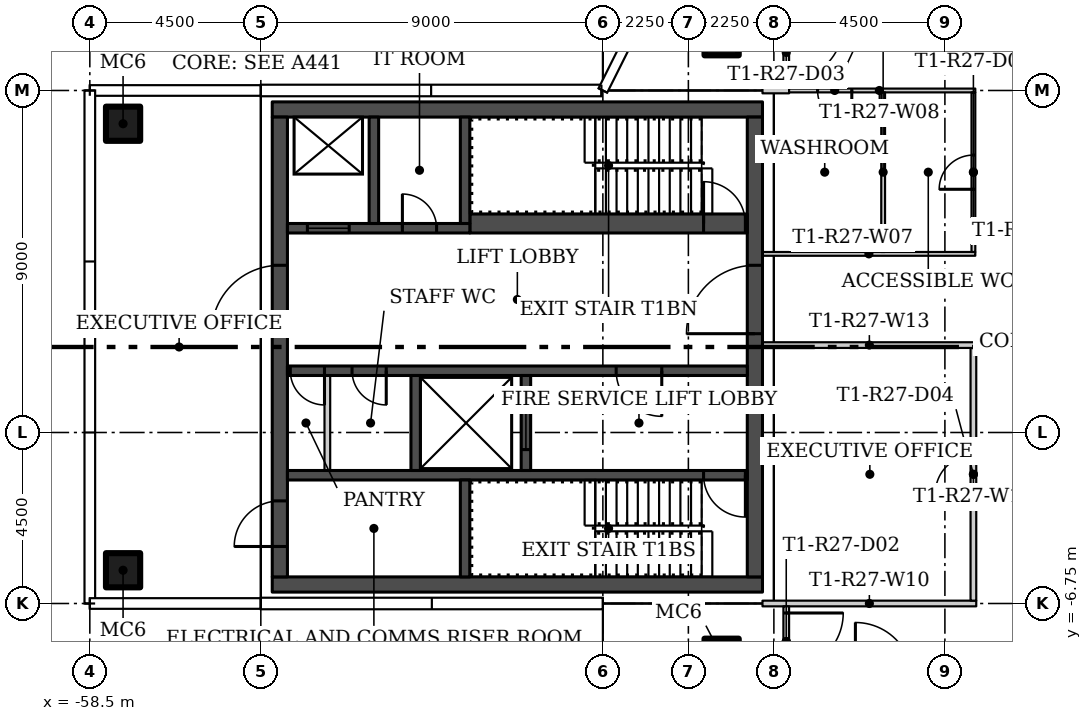
"""IFC4 building model, lengths in metres.
Left out: names, types, materials, properties, quantities, classifications, styles, units other than length and angle.
Written with IfcOpenShell. Run it as: python <this file> out.ifc"""

import sys

from ifc_helpers import new_model, si_unit, direction, frame, frame_2d, origin, origin_2d, place, context, subcontext, project, spatial, rectangle, hollow_rectangle, extrude, element, fill, save


model = new_model("IFC4")
c1 = context("Model", 3, precision=1e-05, world=origin(), true_north=direction((0.0, 1.0)))
c2 = subcontext(c1, "Body", "Model", "MODEL_VIEW")
j1 = project(units=[si_unit("LENGTHUNIT", "METRE"), si_unit("PLANEANGLEUNIT", "RADIAN")], contexts=[c1])
p1 = place(None, origin())
s1 = spatial("IfcSite", under=j1, at=p1, CompositionType="ELEMENT")
p2 = place(p1, origin())
s2 = spatial("IfcBuilding", under=s1, at=p2, CompositionType="ELEMENT")
p3 = place(p2, frame((0.0, 0.0, 249.9)))
s3 = spatial("IfcBuildingStorey", under=s2, at=p3, CompositionType="ELEMENT", Elevation=249.9)
for number, where in (
    (1, (-41.875, 8.125, 0.0)),
    (2, (-41.875, -8.125, 0.0)),
    (3, (-57.625, -5.875, 0.0)),
    (4, (-57.625, 5.875, 0.0)),
):
    element("IfcColumn", number, at=place(p3, frame(where)), inside=s3, PredefinedType="COLUMN", context=c2, shape_type="SweptSolid", body=[
        extrude(hollow_rectangle(XDim=0.9, YDim=0.9, WallThickness=0.036, at=origin_2d()), origin(), (0.0, 0.0, 1.0), 3.55),
    ])
p4 = place(p3, frame((-40.8, 2.45, 0.0)))
e5 = element("IfcWall", 5, at=p4, inside=s3, PredefinedType="PARTITIONING", context=c2, shape_type="SweptSolid", body=[
    extrude(rectangle(XDim=5.6, YDim=0.1, at=frame_2d((2.8, 0.0))), origin(), (0.0, 0.0, 1.0), 3.55),
])
p5 = place(p3, frame((-35.2, 6.75, 0.0), z_axis=(0.0, 0.0, 1.0), x_axis=(-1.0, 0.0, 0.0)))
e6 = element("IfcWall", 6, at=p5, inside=s3, PredefinedType="PARTITIONING", context=c2, shape_type="SweptSolid", body=[
    extrude(rectangle(XDim=5.05, YDim=0.1, at=frame_2d((2.525, 0.0))), origin(), (0.0, 0.0, 1.0), 3.55),
])
p6 = place(p5, frame((3.25, 0.0, 0.0)))
e7 = element("IfcOpeningElement", 7, at=p6, cuts=e6, PredefinedType="OPENING", context=c2, shape_type="SweptSolid", body=[
    extrude(rectangle(XDim=0.9, YDim=2.1, at=frame_2d((0.45, 1.05))), frame((0.0, 0.06, 0.0), z_axis=(0.0, -1.0, 0.0), x_axis=(1.0, 0.0, 0.0)), (0.0, 0.0, 1.0), 0.12),
])
p7 = place(p3, frame((-35.25, 2.5, 0.0), z_axis=(0.0, 0.0, 1.0), x_axis=(0.0, 1.0, 0.0)))
e8 = element("IfcWall", 8, at=p7, inside=s3, PredefinedType="PARTITIONING", context=c2, shape_type="SweptSolid", body=[
    extrude(rectangle(XDim=4.2, YDim=0.1, at=frame_2d((2.1, 0.0))), origin(), (0.0, 0.0, 1.0), 3.55),
])
p8 = place(p7, frame((1.65, 0.0, 0.0)))
e9 = element("IfcOpeningElement", 9, at=p8, cuts=e8, PredefinedType="OPENING", context=c2, shape_type="SweptSolid", body=[
    extrude(rectangle(XDim=0.9, YDim=2.1, at=frame_2d((0.45, 1.05))), frame((0.0, 0.06, 0.0), z_axis=(0.0, -1.0, 0.0), x_axis=(1.0, 0.0, 0.0)), (0.0, 0.0, 1.0), 0.12),
])
p9 = place(p3, frame((-40.8, -6.75, 0.0)))
e10 = element("IfcWall", 10, at=p9, inside=s3, PredefinedType="PARTITIONING", context=c2, shape_type="SweptSolid", body=[
    extrude(rectangle(XDim=5.625, YDim=0.15, at=frame_2d((2.812, 0.0))), origin(), (0.0, 0.0, 1.0), 3.55),
])
p10 = place(p3, frame((-35.25, -6.675, 0.0), z_axis=(0.0, 0.0, 1.0), x_axis=(0.0, 1.0, 0.0)))
e11 = element("IfcWall", 11, at=p10, inside=s3, PredefinedType="PARTITIONING", context=c2, shape_type="SweptSolid", body=[
    extrude(rectangle(XDim=6.65, YDim=0.15, at=frame_2d((3.325, 0.0))), origin(), (0.0, 0.0, 1.0), 3.55),
])
p11 = place(p10, frame((2.825, 0.0, 0.0)))
e12 = element("IfcOpeningElement", 12, at=p11, cuts=e11, PredefinedType="OPENING", context=c2, shape_type="SweptSolid", body=[
    extrude(rectangle(XDim=1.0, YDim=2.4, at=frame_2d((0.5, 1.2))), frame((0.0, 0.085, 0.0), z_axis=(0.0, -1.0, 0.0), x_axis=(1.0, 0.0, 0.0)), (0.0, 0.0, 1.0), 0.17),
])
p12 = place(p3, frame((-35.175, 0.05, 0.0), z_axis=(0.0, 0.0, 1.0), x_axis=(-1.0, 0.0, 0.0)))
e13 = element("IfcWall", 13, at=p12, inside=s3, PredefinedType="PARTITIONING", context=c2, shape_type="SweptSolid", body=[
    extrude(rectangle(XDim=5.625, YDim=0.15, at=frame_2d((2.812, 0.0))), origin(), (0.0, 0.0, 1.0), 3.55),
])
p13 = place(p3, frame((-40.175, 8.675, 0.0), z_axis=(0.0, 0.0, 1.0), x_axis=(0.0, -1.0, 0.0)))
e14 = element("IfcWall", 14, at=p13, inside=s3, PredefinedType="PARTITIONING", context=c2, shape_type="SweptSolid", body=[
    extrude(rectangle(XDim=1.85, YDim=0.15, at=frame_2d((0.925, 0.0))), origin(), (0.0, 0.0, 1.0), 3.55),
])
p14 = place(p13, frame((0.175, 0.0, 0.0)))
e15 = element("IfcOpeningElement", 15, at=p14, cuts=e14, PredefinedType="OPENING", context=c2, shape_type="SweptSolid", body=[
    extrude(rectangle(XDim=1.5, YDim=2.1, at=frame_2d((0.75, 1.05))), frame((0.0, 0.085, 0.0), z_axis=(0.0, -1.0, 0.0), x_axis=(1.0, 0.0, 0.0)), (0.0, 0.0, 1.0), 0.17),
])
p15 = place(p3, frame((-40.175, -6.825, 0.0), z_axis=(0.0, 0.0, 1.0), x_axis=(0.0, -1.0, 0.0)))
e16 = element("IfcWall", 16, at=p15, inside=s3, PredefinedType="PARTITIONING", context=c2, shape_type="SweptSolid", body=[
    extrude(rectangle(XDim=1.85, YDim=0.15, at=frame_2d((0.925, 0.0))), origin(), (0.0, 0.0, 1.0), 3.55),
])
p16 = place(p15, frame((0.175, 0.0, 0.0)))
e17 = element("IfcOpeningElement", 17, at=p16, cuts=e16, PredefinedType="OPENING", context=c2, shape_type="SweptSolid", body=[
    extrude(rectangle(XDim=1.5, YDim=2.1, at=frame_2d((0.75, 1.05))), frame((0.0, 0.085, 0.0), z_axis=(0.0, -1.0, 0.0), x_axis=(1.0, 0.0, 0.0)), (0.0, 0.0, 1.0), 0.17),
])
p17 = place(p3, frame((-40.1, 6.75, 0.0), z_axis=(0.0, 0.0, 1.0), x_axis=(-1.0, 0.0, 0.0)))
e18 = element("IfcWall", 18, at=p17, inside=s3, PredefinedType="PARTITIONING", context=c2, shape_type="SweptSolid", body=[
    extrude(rectangle(XDim=0.7, YDim=0.15, at=frame_2d((0.35, 0.0))), origin(), (0.0, 0.0, 1.0), 3.55),
])
p18 = place(p3, frame((-37.625, 2.5, 0.0), z_axis=(0.0, 0.0, 1.0), x_axis=(0.0, 1.0, 0.0)))
e19 = element("IfcWall", 19, at=p18, inside=s3, PredefinedType="PARTITIONING", context=c2, shape_type="SweptSolid", body=[
    extrude(rectangle(XDim=4.2, YDim=0.1, at=frame_2d((2.1, 0.0))), origin(), (0.0, 0.0, 1.0), 3.55),
])
for number, where, z_axis, x_axis in (
    (20, (-40.8, -6.25, 0.0), (0.0, 0.0, 1.0), (-1.0, 0.0, 0.0)),
    (21, (-40.8, 6.25, 0.0), (0.0, 0.0, 1.0), (-1.0, 0.0, 0.0)),
):
    element("IfcWall", number, at=place(p3, frame(where, z_axis=z_axis, x_axis=x_axis)), inside=s3, PredefinedType="SHEAR", context=c2, shape_type="SweptSolid", body=[
        extrude(rectangle(XDim=12.9, YDim=0.4, at=frame_2d((6.45, 0.0))), origin(), (0.0, 0.0, 1.0), 3.55),
    ])
p19 = place(p3, frame((-41.0, -6.05, 0.0), z_axis=(0.0, 0.0, 1.0), x_axis=(0.0, 1.0, 0.0)))
e22 = element("IfcWall", 22, at=p19, inside=s3, PredefinedType="SHEAR", context=c2, shape_type="SweptSolid", body=[
    extrude(rectangle(XDim=12.1, YDim=0.4, at=frame_2d((6.05, 0.0))), origin(), (0.0, 0.0, 1.0), 3.55),
])
p20 = place(p19, frame((6.4, 0.0, 0.0)))
e23 = element("IfcOpeningElement", 23, at=p20, cuts=e22, PredefinedType="OPENING", context=c2, shape_type="SweptSolid", body=[
    extrude(rectangle(XDim=1.8, YDim=2.4, at=frame_2d((0.9, 1.2))), frame((0.0, 0.21, 0.0), z_axis=(0.0, -1.0, 0.0), x_axis=(1.0, 0.0, 0.0)), (0.0, 0.0, 1.0), 0.42),
])
p21 = place(p3, frame((-53.5, -6.05, 0.0), z_axis=(0.0, 0.0, 1.0), x_axis=(0.0, 1.0, 0.0)))
e24 = element("IfcWall", 24, at=p21, inside=s3, PredefinedType="SHEAR", context=c2, shape_type="SweptSolid", body=[
    extrude(rectangle(XDim=12.1, YDim=0.4, at=frame_2d((6.05, 0.0))), origin(), (0.0, 0.0, 1.0), 3.55),
])
p22 = place(p21, frame((0.8, 0.0, 0.0)))
e25 = element("IfcOpeningElement", 25, at=p22, cuts=e24, PredefinedType="OPENING", context=c2, shape_type="SweptSolid", body=[
    extrude(rectangle(XDim=1.2, YDim=2.1, at=frame_2d((0.6, 1.05))), frame((0.0, 0.21, 0.0), z_axis=(0.0, -1.0, 0.0), x_axis=(1.0, 0.0, 0.0)), (0.0, 0.0, 1.0), 0.42),
])
p23 = place(p21, frame((6.4, 0.0, 0.0)))
e26 = element("IfcOpeningElement", 26, at=p23, cuts=e24, PredefinedType="OPENING", context=c2, shape_type="SweptSolid", body=[
    extrude(rectangle(XDim=1.8, YDim=2.4, at=frame_2d((0.9, 1.2))), frame((0.0, 0.21, 0.0), z_axis=(0.0, -1.0, 0.0), x_axis=(1.0, 0.0, 0.0)), (0.0, 0.0, 1.0), 0.42),
])
p24 = place(p3, frame((-41.2, -3.375, 0.0), z_axis=(0.0, 0.0, 1.0), x_axis=(-1.0, 0.0, 0.0)))
e27 = element("IfcWall", 27, at=p24, inside=s3, PredefinedType="SHEAR", context=c2, shape_type="SweptSolid", body=[
    extrude(rectangle(XDim=12.1, YDim=0.25, at=frame_2d((6.05, 0.0))), origin(), (0.0, 0.0, 1.0), 3.55),
])
p25 = place(p24, frame((0.05, 0.0, 0.0)))
e28 = element("IfcOpeningElement", 28, at=p25, cuts=e27, PredefinedType="OPENING", context=c2, shape_type="SweptSolid", body=[
    extrude(rectangle(XDim=1.1, YDim=2.1, at=frame_2d((0.55, 1.05))), frame((0.0, 0.135, 0.0), z_axis=(0.0, -1.0, 0.0), x_axis=(1.0, 0.0, 0.0)), (0.0, 0.0, 1.0), 0.27),
])
p26 = place(p3, frame((-48.625, -6.05, 0.0), z_axis=(0.0, 0.0, 1.0), x_axis=(0.0, 1.0, 0.0)))
e29 = element("IfcWall", 29, at=p26, inside=s3, PredefinedType="SHEAR", context=c2, shape_type="SweptSolid", body=[
    extrude(rectangle(XDim=2.55, YDim=0.25, at=frame_2d((1.275, 0.0))), origin(), (0.0, 0.0, 1.0), 3.55),
])
p27 = place(p3, frame((-41.2, -0.625, 0.0), z_axis=(0.0, 0.0, 1.0), x_axis=(-1.0, 0.0, 0.0)))
e30 = element("IfcWall", 30, at=p27, inside=s3, PredefinedType="SHEAR", context=c2, shape_type="SweptSolid", body=[
    extrude(rectangle(XDim=12.1, YDim=0.25, at=frame_2d((6.05, 0.0))), origin(), (0.0, 0.0, 1.0), 3.55),
])
p28 = place(p27, frame((2.25, 0.0, 0.0)))
e31 = element("IfcOpeningElement", 31, at=p28, cuts=e30, PredefinedType="OPENING", context=c2, shape_type="SweptSolid", body=[
    extrude(rectangle(XDim=1.2, YDim=2.1, at=frame_2d((0.6, 1.05))), frame((0.0, 0.135, 0.0), z_axis=(0.0, -1.0, 0.0), x_axis=(1.0, 0.0, 0.0)), (0.0, 0.0, 1.0), 0.27),
])
p29 = place(p27, frame((9.5, 0.0, 0.0)))
e32 = element("IfcOpeningElement", 32, at=p29, cuts=e30, PredefinedType="OPENING", context=c2, shape_type="SweptSolid", body=[
    extrude(rectangle(XDim=0.9, YDim=2.1, at=frame_2d((0.45, 1.05))), frame((0.0, 0.135, 0.0), z_axis=(0.0, -1.0, 0.0), x_axis=(1.0, 0.0, 0.0)), (0.0, 0.0, 1.0), 0.27),
])
p30 = place(p27, frame((11.125, 0.0, 0.0)))
e33 = element("IfcOpeningElement", 33, at=p30, cuts=e30, PredefinedType="OPENING", context=c2, shape_type="SweptSolid", body=[
    extrude(rectangle(XDim=0.9, YDim=2.1, at=frame_2d((0.45, 1.05))), frame((0.0, 0.135, 0.0), z_axis=(0.0, -1.0, 0.0), x_axis=(1.0, 0.0, 0.0)), (0.0, 0.0, 1.0), 0.27),
])
p31 = place(p3, frame((-47.025, -3.25, 0.0), z_axis=(0.0, 0.0, 1.0), x_axis=(0.0, 1.0, 0.0)))
e34 = element("IfcWall", 34, at=p31, inside=s3, PredefinedType="SHEAR", context=c2, shape_type="SweptSolid", body=[
    extrude(rectangle(XDim=2.5, YDim=0.25, at=frame_2d((1.25, 0.0))), origin(), (0.0, 0.0, 1.0), 3.55),
])
p32 = place(p31, frame((0.55, 0.0, 0.0)))
e35 = element("IfcOpeningElement", 35, at=p32, cuts=e34, PredefinedType="OPENING", context=c2, shape_type="SweptSolid", body=[
    extrude(rectangle(XDim=1.4, YDim=2.4, at=frame_2d((0.7, 1.2))), frame((0.0, 0.135, 0.0), z_axis=(0.0, -1.0, 0.0), x_axis=(1.0, 0.0, 0.0)), (0.0, 0.0, 1.0), 0.27),
])
p33 = place(p3, frame((-49.925, -3.25, 0.0), z_axis=(0.0, 0.0, 1.0), x_axis=(0.0, 1.0, 0.0)))
e36 = element("IfcWall", 36, at=p33, inside=s3, PredefinedType="SHEAR", context=c2, shape_type="SweptSolid", body=[
    extrude(rectangle(XDim=2.5, YDim=0.25, at=frame_2d((1.25, 0.0))), origin(), (0.0, 0.0, 1.0), 3.55),
])
p34 = place(p3, frame((-52.25, -3.25, 0.0), z_axis=(0.0, 0.0, 1.0), x_axis=(0.0, 1.0, 0.0)))
e37 = element("IfcWall", 37, at=p34, inside=s3, PredefinedType="PARTITIONING", context=c2, shape_type="SweptSolid", body=[
    extrude(rectangle(XDim=2.5, YDim=0.15, at=frame_2d((1.25, 0.0))), origin(), (0.0, 0.0, 1.0), 3.55),
])
p35 = place(p3, frame((-48.5, 3.25, 0.0)))
e38 = element("IfcWall", 38, at=p35, inside=s3, PredefinedType="SHEAR", context=c2, shape_type="SweptSolid", body=[
    extrude(rectangle(XDim=7.3, YDim=0.5, at=frame_2d((3.65, 0.0))), origin(), (0.0, 0.0, 1.0), 3.55),
])
p36 = place(p35, frame((6.15, 0.0, 0.0)))
e39 = element("IfcOpeningElement", 39, at=p36, cuts=e38, PredefinedType="OPENING", context=c2, shape_type="SweptSolid", body=[
    extrude(rectangle(XDim=1.1, YDim=2.1, at=frame_2d((0.55, 1.05))), frame((0.0, 0.26, 0.0), z_axis=(0.0, -1.0, 0.0), x_axis=(1.0, 0.0, 0.0)), (0.0, 0.0, 1.0), 0.52),
])
p37 = place(p3, frame((-53.3, 3.125, 0.0)))
e40 = element("IfcWall", 40, at=p37, inside=s3, PredefinedType="SHEAR", context=c2, shape_type="SweptSolid", body=[
    extrude(rectangle(XDim=4.8, YDim=0.25, at=frame_2d((2.4, 0.0))), origin(), (0.0, 0.0, 1.0), 3.55),
])
p38 = place(p37, frame((0.525, 0.0, 0.0)))
e41 = element("IfcOpeningElement", 41, at=p38, cuts=e40, PredefinedType="OPENING", context=c2, shape_type="SweptSolid", body=[
    extrude(rectangle(XDim=1.1, YDim=2.1, at=frame_2d((0.55, 1.05))), frame((0.0, 0.135, 0.0), z_axis=(0.0, -1.0, 0.0), x_axis=(1.0, 0.0, 0.0)), (0.0, 0.0, 1.0), 0.27),
])
p39 = place(p37, frame((3.025, 0.0, 0.0)))
e42 = element("IfcOpeningElement", 42, at=p39, cuts=e40, PredefinedType="OPENING", context=c2, shape_type="SweptSolid", body=[
    extrude(rectangle(XDim=0.9, YDim=2.1, at=frame_2d((0.45, 1.05))), frame((0.0, 0.135, 0.0), z_axis=(0.0, -1.0, 0.0), x_axis=(1.0, 0.0, 0.0)), (0.0, 0.0, 1.0), 0.27),
])
for number, where, z_axis, x_axis in (
    (43, (-48.625, 3.25, 0.0), (0.0, 0.0, 1.0), (0.0, 1.0, 0.0)),
    (44, (-51.025, 3.25, 0.0), (0.0, 0.0, 1.0), (0.0, 1.0, 0.0)),
):
    element("IfcWall", number, at=place(p3, frame(where, z_axis=z_axis, x_axis=x_axis)), inside=s3, PredefinedType="SHEAR", context=c2, shape_type="SweptSolid", body=[
        extrude(rectangle(XDim=2.8, YDim=0.25, at=frame_2d((1.4, 0.0))), origin(), (0.0, 0.0, 1.0), 3.55),
    ])
p40 = place(p16, origin())
e45 = element("IfcDoor", 45, at=p40, inside=s3, OperationType="DOUBLE_DOOR_SINGLE_SWING", PredefinedType="DOOR", context=c2, shape_type="SweptSolid", body=[
    extrude(rectangle(XDim=1.5, YDim=2.1, at=frame_2d((0.75, 1.05))), frame((0.0, 0.025, 0.0), z_axis=(0.0, -1.0, 0.0), x_axis=(1.0, 0.0, 0.0)), (0.0, 0.0, 1.0), 0.05),
])
fill(e17, e45)
p41 = place(p14, origin())
e46 = element("IfcDoor", 46, at=p41, inside=s3, OperationType="DOUBLE_DOOR_SINGLE_SWING", PredefinedType="DOOR", context=c2, shape_type="SweptSolid", body=[
    extrude(rectangle(XDim=1.5, YDim=2.1, at=frame_2d((0.75, 1.05))), frame((0.0, 0.025, 0.0), z_axis=(0.0, -1.0, 0.0), x_axis=(1.0, 0.0, 0.0)), (0.0, 0.0, 1.0), 0.05),
])
fill(e15, e46)
p42 = place(p11, origin())
e47 = element("IfcDoor", 47, at=p42, inside=s3, OperationType="SINGLE_SWING_LEFT", PredefinedType="DOOR", context=c2, shape_type="SweptSolid", body=[
    extrude(rectangle(XDim=1.0, YDim=2.4, at=frame_2d((0.5, 1.2))), frame((0.0, 0.025, 0.0), z_axis=(0.0, -1.0, 0.0), x_axis=(1.0, 0.0, 0.0)), (0.0, 0.0, 1.0), 0.05),
])
fill(e12, e47)
p43 = place(p8, origin())
e48 = element("IfcDoor", 48, at=p43, inside=s3, OperationType="SINGLE_SWING_RIGHT", PredefinedType="DOOR", context=c2, shape_type="SweptSolid", body=[
    extrude(rectangle(XDim=0.9, YDim=2.1, at=frame_2d((0.45, 1.05))), frame((0.0, 0.025, 0.0), z_axis=(0.0, -1.0, 0.0), x_axis=(1.0, 0.0, 0.0)), (0.0, 0.0, 1.0), 0.05),
])
fill(e9, e48)
p44 = place(p6, origin())
e49 = element("IfcDoor", 49, at=p44, inside=s3, OperationType="SINGLE_SWING_LEFT", PredefinedType="DOOR", context=c2, shape_type="SweptSolid", body=[
    extrude(rectangle(XDim=0.9, YDim=2.1, at=frame_2d((0.45, 1.05))), frame((0.0, 0.025, 0.0), z_axis=(0.0, -1.0, 0.0), x_axis=(1.0, 0.0, 0.0)), (0.0, 0.0, 1.0), 0.05),
])
fill(e7, e49)
p45 = place(p20, origin())
e50 = element("IfcDoor", 50, at=p45, inside=s3, OperationType="DOUBLE_DOOR_SINGLE_SWING", PredefinedType="DOOR", context=c2, shape_type="SweptSolid", body=[
    extrude(rectangle(XDim=1.8, YDim=2.4, at=frame_2d((0.9, 1.2))), frame((0.0, 0.025, 0.0), z_axis=(0.0, -1.0, 0.0), x_axis=(1.0, 0.0, 0.0)), (0.0, 0.0, 1.0), 0.05),
])
fill(e23, e50)
p46 = place(p22, origin())
e51 = element("IfcDoor", 51, at=p46, inside=s3, OperationType="SINGLE_SWING_LEFT", PredefinedType="DOOR", context=c2, shape_type="SweptSolid", body=[
    extrude(rectangle(XDim=1.2, YDim=2.1, at=frame_2d((0.6, 1.05))), frame((0.0, 0.025, 0.0), z_axis=(0.0, -1.0, 0.0), x_axis=(1.0, 0.0, 0.0)), (0.0, 0.0, 1.0), 0.05),
])
fill(e25, e51)
p47 = place(p23, origin())
e52 = element("IfcDoor", 52, at=p47, inside=s3, OperationType="DOUBLE_DOOR_SINGLE_SWING", PredefinedType="DOOR", context=c2, shape_type="SweptSolid", body=[
    extrude(rectangle(XDim=1.8, YDim=2.4, at=frame_2d((0.9, 1.2))), frame((0.0, 0.025, 0.0), z_axis=(0.0, -1.0, 0.0), x_axis=(1.0, 0.0, 0.0)), (0.0, 0.0, 1.0), 0.05),
])
fill(e26, e52)
p48 = place(p25, origin())
e53 = element("IfcDoor", 53, at=p48, inside=s3, OperationType="SINGLE_SWING_LEFT", PredefinedType="DOOR", context=c2, shape_type="SweptSolid", body=[
    extrude(rectangle(XDim=1.1, YDim=2.1, at=frame_2d((0.55, 1.05))), frame((0.0, 0.025, 0.0), z_axis=(0.0, -1.0, 0.0), x_axis=(1.0, 0.0, 0.0)), (0.0, 0.0, 1.0), 0.05),
])
fill(e28, e53)
p49 = place(p28, origin())
e54 = element("IfcDoor", 54, at=p49, inside=s3, OperationType="SINGLE_SWING_LEFT", PredefinedType="DOOR", context=c2, shape_type="SweptSolid", body=[
    extrude(rectangle(XDim=1.2, YDim=2.1, at=frame_2d((0.6, 1.05))), frame((0.0, 0.025, 0.0), z_axis=(0.0, -1.0, 0.0), x_axis=(1.0, 0.0, 0.0)), (0.0, 0.0, 1.0), 0.05),
])
fill(e31, e54)
p50 = place(p29, origin())
e55 = element("IfcDoor", 55, at=p50, inside=s3, OperationType="SINGLE_SWING_RIGHT", PredefinedType="DOOR", context=c2, shape_type="SweptSolid", body=[
    extrude(rectangle(XDim=0.9, YDim=2.1, at=frame_2d((0.45, 1.05))), frame((0.0, 0.025, 0.0), z_axis=(0.0, -1.0, 0.0), x_axis=(1.0, 0.0, 0.0)), (0.0, 0.0, 1.0), 0.05),
])
fill(e32, e55)
p51 = place(p30, origin())
e56 = element("IfcDoor", 56, at=p51, inside=s3, OperationType="SINGLE_SWING_RIGHT", PredefinedType="DOOR", context=c2, shape_type="SweptSolid", body=[
    extrude(rectangle(XDim=0.9, YDim=2.1, at=frame_2d((0.45, 1.05))), frame((0.0, 0.025, 0.0), z_axis=(0.0, -1.0, 0.0), x_axis=(1.0, 0.0, 0.0)), (0.0, 0.0, 1.0), 0.05),
])
fill(e33, e56)
p52 = place(p32, origin())
e57 = element("IfcDoor", 57, at=p52, inside=s3, OperationType="SLIDING_TO_LEFT", PredefinedType="DOOR", context=c2, shape_type="SweptSolid", body=[
    extrude(rectangle(XDim=1.4, YDim=2.4, at=frame_2d((0.7, 1.2))), frame((0.0, 0.025, 0.0), z_axis=(0.0, -1.0, 0.0), x_axis=(1.0, 0.0, 0.0)), (0.0, 0.0, 1.0), 0.05),
])
fill(e35, e57)
p53 = place(p36, origin())
e58 = element("IfcDoor", 58, at=p53, inside=s3, OperationType="SINGLE_SWING_RIGHT", PredefinedType="DOOR", context=c2, shape_type="SweptSolid", body=[
    extrude(rectangle(XDim=1.1, YDim=2.1, at=frame_2d((0.55, 1.05))), frame((0.0, 0.025, 0.0), z_axis=(0.0, -1.0, 0.0), x_axis=(1.0, 0.0, 0.0)), (0.0, 0.0, 1.0), 0.05),
])
fill(e39, e58)
p54 = place(p38, origin())
e59 = element("IfcDoor", 59, at=p54, inside=s3, OperationType="SLIDING_TO_LEFT", PredefinedType="DOOR", context=c2, shape_type="SweptSolid", body=[
    extrude(rectangle(XDim=1.1, YDim=2.1, at=frame_2d((0.55, 1.05))), frame((0.0, 0.025, 0.0), z_axis=(0.0, -1.0, 0.0), x_axis=(1.0, 0.0, 0.0)), (0.0, 0.0, 1.0), 0.05),
])
fill(e41, e59)
p55 = place(p39, origin())
e60 = element("IfcDoor", 60, at=p55, inside=s3, OperationType="SINGLE_SWING_RIGHT", PredefinedType="DOOR", context=c2, shape_type="SweptSolid", body=[
    extrude(rectangle(XDim=0.9, YDim=2.1, at=frame_2d((0.45, 1.05))), frame((0.0, 0.025, 0.0), z_axis=(0.0, -1.0, 0.0), x_axis=(1.0, 0.0, 0.0)), (0.0, 0.0, 1.0), 0.05),
])
fill(e42, e60)
save(model, sys.argv[1])
